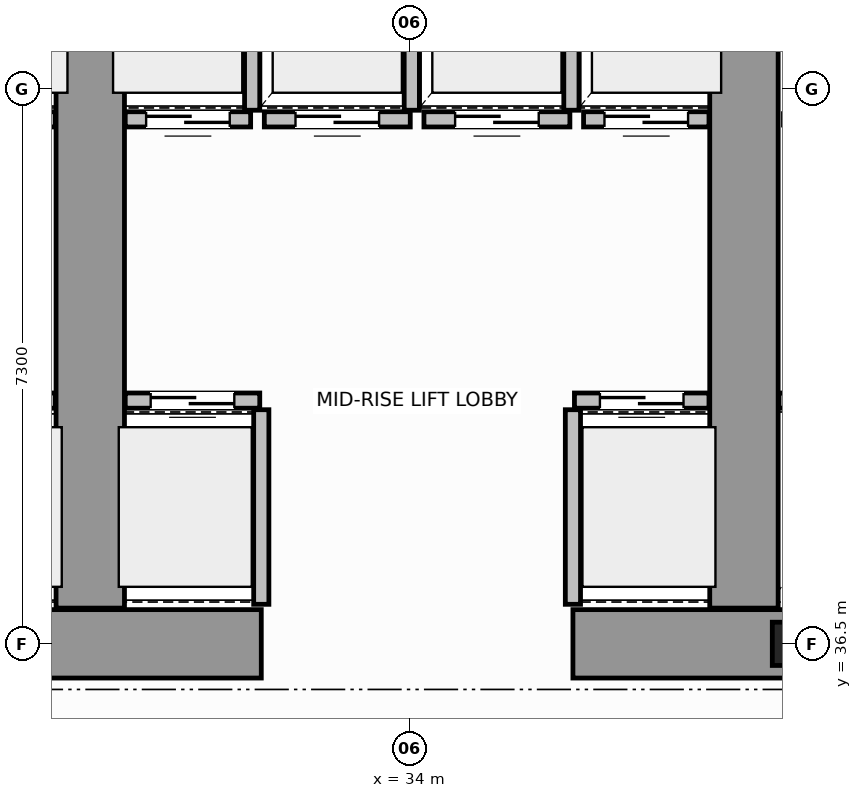
"""IFC4 building model, lengths in metres.
Left out: names, types, materials, properties, quantities, classifications, styles, units other than length and angle.
Written with IfcOpenShell. Run it as: python <this file> out.ifc"""

import sys

from ifc_helpers import new_model, si_unit, direction, frame, frame_2d, origin, origin_2d, place, context, subcontext, project, spatial, rectangle, i_section, extrude, source, transform, mapped, element, fill, save


model = new_model("IFC4")
c1 = context("Model", 3, precision=1e-05, world=origin(), true_north=direction((0.0, 1.0)))
c2 = subcontext(c1, "Body", "Model", "MODEL_VIEW")
j1 = project(units=[si_unit("LENGTHUNIT", "METRE"), si_unit("PLANEANGLEUNIT", "RADIAN")], contexts=[c1])
p1 = place(None, origin())
s1 = spatial("IfcSite", under=j1, at=p1, CompositionType="ELEMENT")
p2 = place(p1, origin())
s2 = spatial("IfcBuilding", under=s1, at=p2, CompositionType="ELEMENT")
p3 = place(p2, frame((0.0, 0.0, 14.4)))
s3 = spatial("IfcBuildingStorey", under=s2, at=p3, CompositionType="ELEMENT", Elevation=14.4)
m1 = source(origin(), c2, "Body", "SweptSolid", [
    extrude(i_section(OverallWidth=0.454, OverallDepth=0.569, WebThickness=0.078, FlangeThickness=0.08, FilletRadius=0.015, at=origin_2d()), origin(), (0.0, 0.0, 1.0), 4.4),
])
p4 = place(p3, frame((39.0, 36.5, 0.0), z_axis=(0.0, 0.0, 1.0), x_axis=(1.0, 0.0, 0.0)))
e1 = element("IfcColumn", 1, at=p4, inside=s3, PredefinedType="COLUMN", context=c2, shape_type="MappedRepresentation", body=[
    mapped(m1, transform((0.0, 0.0, 0.0), scale=1.0)),
])
for number, where, z_axis, x_axis in (
    (2, (27.55, 36.5, 0.0), (0.0, 0.0, 1.0), (1.0, 0.0, 0.0)),
    (3, (36.15, 36.5, 0.0), (0.0, 0.0, 1.0), (1.0, 0.0, 0.0)),
):
    element("IfcWall", number, at=place(p3, frame(where, z_axis=z_axis, x_axis=x_axis)), inside=s3, PredefinedType="SHEAR", context=c2, shape_type="SweptSolid", body=[
        extrude(rectangle(XDim=4.5, YDim=0.9, at=frame_2d((2.25, 0.0))), origin(), (0.0, 0.0, 1.0), 4.4),
    ])
for number, where, z_axis, x_axis in (
    (4, (29.8, 36.97, 0.0), (0.0, 0.0, 1.0), (0.0, 1.0, 0.0)),
    (5, (38.4, 36.97, 0.0), (0.0, 0.0, 1.0), (0.0, 1.0, 0.0)),
):
    element("IfcWall", number, at=place(p3, frame(where, z_axis=z_axis, x_axis=x_axis)), inside=s3, PredefinedType="SHEAR", context=c2, shape_type="SweptSolid", body=[
        extrude(rectangle(XDim=9.23, YDim=0.9, at=frame_2d((4.615, 0.0))), origin(), (0.0, 0.0, 1.0), 4.4),
    ])
p5 = place(p3, frame((27.57, 39.7, 0.0), z_axis=(0.0, 0.0, 1.0), x_axis=(1.0, 0.0, 0.0)))
e6 = element("IfcWall", 6, at=p5, inside=s3, PredefinedType="SOLIDWALL", context=c2, shape_type="SweptSolid", body=[
    extrude(rectangle(XDim=1.77, YDim=0.2, at=frame_2d((0.885, 0.0))), origin(), (0.0, 0.0, 1.0), 4.12),
])
p6 = place(p5, frame((0.335, 0.0, 0.0)))
e7 = element("IfcOpeningElement", 7, at=p6, cuts=e6, PredefinedType="OPENING", context=c2, shape_type="SweptSolid", body=[
    extrude(rectangle(XDim=1.1, YDim=2.15, at=frame_2d((0.55, 1.075))), frame((0.0, 0.11, 0.0), z_axis=(0.0, -1.0, 0.0), x_axis=(1.0, 0.0, 0.0)), (0.0, 0.0, 1.0), 0.22),
])
p7 = place(p3, frame((27.69, 43.4, 0.0), z_axis=(0.0, 0.0, 1.0), x_axis=(1.0, 0.0, 0.0)))
e8 = element("IfcWall", 8, at=p7, inside=s3, PredefinedType="SOLIDWALL", context=c2, shape_type="SweptSolid", body=[
    extrude(rectangle(XDim=1.65, YDim=0.2, at=frame_2d((0.825, 0.0))), origin(), (0.0, 0.0, 1.0), 4.12),
])
p8 = place(p7, frame((0.275, 0.0, 0.0)))
e9 = element("IfcOpeningElement", 9, at=p8, cuts=e8, PredefinedType="OPENING", context=c2, shape_type="SweptSolid", body=[
    extrude(rectangle(XDim=1.1, YDim=2.15, at=frame_2d((0.55, 1.075))), frame((0.0, 0.11, 0.0), z_axis=(0.0, -1.0, 0.0), x_axis=(1.0, 0.0, 0.0)), (0.0, 0.0, 1.0), 0.22),
])
p9 = place(p3, frame((30.26, 39.7, 0.0), z_axis=(0.0, 0.0, 1.0), x_axis=(1.0, 0.0, 0.0)))
e10 = element("IfcWall", 10, at=p9, inside=s3, PredefinedType="SOLIDWALL", context=c2, shape_type="SweptSolid", body=[
    extrude(rectangle(XDim=1.77, YDim=0.2, at=frame_2d((0.885, 0.0))), origin(), (0.0, 0.0, 1.0), 4.12),
])
p10 = place(p9, frame((0.335, 0.0, 0.0)))
e11 = element("IfcOpeningElement", 11, at=p10, cuts=e10, PredefinedType="OPENING", context=c2, shape_type="SweptSolid", body=[
    extrude(rectangle(XDim=1.1, YDim=2.15, at=frame_2d((0.55, 1.075))), frame((0.0, 0.11, 0.0), z_axis=(0.0, -1.0, 0.0), x_axis=(1.0, 0.0, 0.0)), (0.0, 0.0, 1.0), 0.22),
])
p11 = place(p3, frame((32.05, 37.02, 0.0), z_axis=(0.0, 0.0, 1.0), x_axis=(0.0, 1.0, 0.0)))
e12 = element("IfcWall", 12, at=p11, inside=s3, PredefinedType="SOLIDWALL", context=c2, shape_type="SweptSolid", body=[
    extrude(rectangle(XDim=2.56, YDim=0.2, at=frame_2d((1.28, 0.0))), origin(), (0.0, 0.0, 1.0), 4.12),
])
p12 = place(p3, frame((36.17, 39.7, 0.0), z_axis=(0.0, 0.0, 1.0), x_axis=(1.0, 0.0, 0.0)))
e13 = element("IfcWall", 13, at=p12, inside=s3, PredefinedType="SOLIDWALL", context=c2, shape_type="SweptSolid", body=[
    extrude(rectangle(XDim=1.77, YDim=0.2, at=frame_2d((0.885, 0.0))), origin(), (0.0, 0.0, 1.0), 4.12),
])
p13 = place(p12, frame((0.335, 0.0, 0.0)))
e14 = element("IfcOpeningElement", 14, at=p13, cuts=e13, PredefinedType="OPENING", context=c2, shape_type="SweptSolid", body=[
    extrude(rectangle(XDim=1.1, YDim=2.15, at=frame_2d((0.55, 1.075))), frame((0.0, 0.11, 0.0), z_axis=(0.0, -1.0, 0.0), x_axis=(1.0, 0.0, 0.0)), (0.0, 0.0, 1.0), 0.22),
])
p14 = place(p3, frame((36.15, 37.02, 0.0), z_axis=(0.0, 0.0, 1.0), x_axis=(0.0, 1.0, 0.0)))
e15 = element("IfcWall", 15, at=p14, inside=s3, PredefinedType="SOLIDWALL", context=c2, shape_type="SweptSolid", body=[
    extrude(rectangle(XDim=2.56, YDim=0.2, at=frame_2d((1.28, 0.0))), origin(), (0.0, 0.0, 1.0), 4.12),
])
p15 = place(p3, frame((30.26, 43.4, 0.0), z_axis=(0.0, 0.0, 1.0), x_axis=(1.0, 0.0, 0.0)))
e16 = element("IfcWall", 16, at=p15, inside=s3, PredefinedType="SOLIDWALL", context=c2, shape_type="SweptSolid", body=[
    extrude(rectangle(XDim=1.65, YDim=0.2, at=frame_2d((0.825, 0.0))), origin(), (0.0, 0.0, 1.0), 4.12),
])
p16 = place(p15, frame((0.275, 0.0, 0.0)))
e17 = element("IfcOpeningElement", 17, at=p16, cuts=e16, PredefinedType="OPENING", context=c2, shape_type="SweptSolid", body=[
    extrude(rectangle(XDim=1.1, YDim=2.15, at=frame_2d((0.55, 1.075))), frame((0.0, 0.11, 0.0), z_axis=(0.0, -1.0, 0.0), x_axis=(1.0, 0.0, 0.0)), (0.0, 0.0, 1.0), 0.22),
])
p17 = place(p3, frame((31.93, 43.52, 0.0), z_axis=(0.0, 0.0, 1.0), x_axis=(0.0, 1.0, 0.0)))
e18 = element("IfcWall", 18, at=p17, inside=s3, PredefinedType="SOLIDWALL", context=c2, shape_type="SweptSolid", body=[
    extrude(rectangle(XDim=2.56, YDim=0.2, at=frame_2d((1.28, 0.0))), origin(), (0.0, 0.0, 1.0), 4.12),
])
p18 = place(p3, frame((32.09, 43.4, 0.0), z_axis=(0.0, 0.0, 1.0), x_axis=(1.0, 0.0, 0.0)))
e19 = element("IfcWall", 19, at=p18, inside=s3, PredefinedType="SOLIDWALL", context=c2, shape_type="SweptSolid", body=[
    extrude(rectangle(XDim=1.92, YDim=0.2, at=frame_2d((0.96, 0.0))), origin(), (0.0, 0.0, 1.0), 4.12),
])
p19 = place(p18, frame((0.41, 0.0, 0.0)))
e20 = element("IfcOpeningElement", 20, at=p19, cuts=e19, PredefinedType="OPENING", context=c2, shape_type="SweptSolid", body=[
    extrude(rectangle(XDim=1.1, YDim=2.15, at=frame_2d((0.55, 1.075))), frame((0.0, 0.11, 0.0), z_axis=(0.0, -1.0, 0.0), x_axis=(1.0, 0.0, 0.0)), (0.0, 0.0, 1.0), 0.22),
])
p20 = place(p3, frame((34.03, 43.52, 0.0), z_axis=(0.0, 0.0, 1.0), x_axis=(0.0, 1.0, 0.0)))
e21 = element("IfcWall", 21, at=p20, inside=s3, PredefinedType="SOLIDWALL", context=c2, shape_type="SweptSolid", body=[
    extrude(rectangle(XDim=2.56, YDim=0.2, at=frame_2d((1.28, 0.0))), origin(), (0.0, 0.0, 1.0), 4.12),
])
p21 = place(p3, frame((34.19, 43.4, 0.0), z_axis=(0.0, 0.0, 1.0), x_axis=(1.0, 0.0, 0.0)))
e22 = element("IfcWall", 22, at=p21, inside=s3, PredefinedType="SOLIDWALL", context=c2, shape_type="SweptSolid", body=[
    extrude(rectangle(XDim=1.92, YDim=0.2, at=frame_2d((0.96, 0.0))), origin(), (0.0, 0.0, 1.0), 4.12),
])
p22 = place(p21, frame((0.41, 0.0, 0.0)))
e23 = element("IfcOpeningElement", 23, at=p22, cuts=e22, PredefinedType="OPENING", context=c2, shape_type="SweptSolid", body=[
    extrude(rectangle(XDim=1.1, YDim=2.15, at=frame_2d((0.55, 1.075))), frame((0.0, 0.11, 0.0), z_axis=(0.0, -1.0, 0.0), x_axis=(1.0, 0.0, 0.0)), (0.0, 0.0, 1.0), 0.22),
])
p23 = place(p3, frame((36.13, 43.52, 0.0), z_axis=(0.0, 0.0, 1.0), x_axis=(0.0, 1.0, 0.0)))
e24 = element("IfcWall", 24, at=p23, inside=s3, PredefinedType="SOLIDWALL", context=c2, shape_type="SweptSolid", body=[
    extrude(rectangle(XDim=2.56, YDim=0.2, at=frame_2d((1.28, 0.0))), origin(), (0.0, 0.0, 1.0), 4.12),
])
p24 = place(p3, frame((36.29, 43.4, 0.0), z_axis=(0.0, 0.0, 1.0), x_axis=(1.0, 0.0, 0.0)))
e25 = element("IfcWall", 25, at=p24, inside=s3, PredefinedType="SOLIDWALL", context=c2, shape_type="SweptSolid", body=[
    extrude(rectangle(XDim=1.65, YDim=0.2, at=frame_2d((0.825, 0.0))), origin(), (0.0, 0.0, 1.0), 4.12),
])
p25 = place(p24, frame((0.275, 0.0, 0.0)))
e26 = element("IfcOpeningElement", 26, at=p25, cuts=e25, PredefinedType="OPENING", context=c2, shape_type="SweptSolid", body=[
    extrude(rectangle(XDim=1.1, YDim=2.15, at=frame_2d((0.55, 1.075))), frame((0.0, 0.11, 0.0), z_axis=(0.0, -1.0, 0.0), x_axis=(1.0, 0.0, 0.0)), (0.0, 0.0, 1.0), 0.22),
])
p26 = place(p3, frame((38.86, 39.7, 0.0), z_axis=(0.0, 0.0, 1.0), x_axis=(1.0, 0.0, 0.0)))
e27 = element("IfcWall", 27, at=p26, inside=s3, PredefinedType="SOLIDWALL", context=c2, shape_type="SweptSolid", body=[
    extrude(rectangle(XDim=1.77, YDim=0.2, at=frame_2d((0.885, 0.0))), origin(), (0.0, 0.0, 1.0), 4.12),
])
m2 = source(origin(), c2, "Body", "SweptSolid", [
    extrude(rectangle(XDim=1.1, YDim=2.15, at=frame_2d((0.55, 1.075))), frame((0.0, 0.025, 0.0), z_axis=(0.0, -1.0, 0.0), x_axis=(1.0, 0.0, 0.0)), (0.0, 0.0, 1.0), 0.05),
])
p27 = place(p10, origin())
e28 = element("IfcDoor", 28, at=p27, inside=s3, OperationType="DOUBLE_DOOR_SLIDING", PredefinedType="DOOR", context=c2, shape_type="MappedRepresentation", body=[
    mapped(m2, transform((0.0, 0.0, 0.0), scale=1.0)),
])
fill(e11, e28)
p28 = place(p13, origin())
e29 = element("IfcDoor", 29, at=p28, inside=s3, OperationType="DOUBLE_DOOR_SLIDING", PredefinedType="DOOR", context=c2, shape_type="MappedRepresentation", body=[
    mapped(m2, transform((0.0, 0.0, 0.0), scale=1.0)),
])
fill(e14, e29)
p29 = place(p16, origin())
e30 = element("IfcDoor", 30, at=p29, inside=s3, OperationType="DOUBLE_DOOR_SLIDING", PredefinedType="DOOR", context=c2, shape_type="MappedRepresentation", body=[
    mapped(m2, transform((0.0, 0.0, 0.0), scale=1.0)),
])
fill(e17, e30)
p30 = place(p19, origin())
e31 = element("IfcDoor", 31, at=p30, inside=s3, OperationType="DOUBLE_DOOR_SLIDING", PredefinedType="DOOR", context=c2, shape_type="MappedRepresentation", body=[
    mapped(m2, transform((0.0, 0.0, 0.0), scale=1.0)),
])
fill(e20, e31)
p31 = place(p22, origin())
e32 = element("IfcDoor", 32, at=p31, inside=s3, OperationType="DOUBLE_DOOR_SLIDING", PredefinedType="DOOR", context=c2, shape_type="MappedRepresentation", body=[
    mapped(m2, transform((0.0, 0.0, 0.0), scale=1.0)),
])
fill(e23, e32)
p32 = place(p25, origin())
e33 = element("IfcDoor", 33, at=p32, inside=s3, OperationType="DOUBLE_DOOR_SLIDING", PredefinedType="DOOR", context=c2, shape_type="MappedRepresentation", body=[
    mapped(m2, transform((0.0, 0.0, 0.0), scale=1.0)),
])
fill(e26, e33)
save(model, sys.argv[1])
